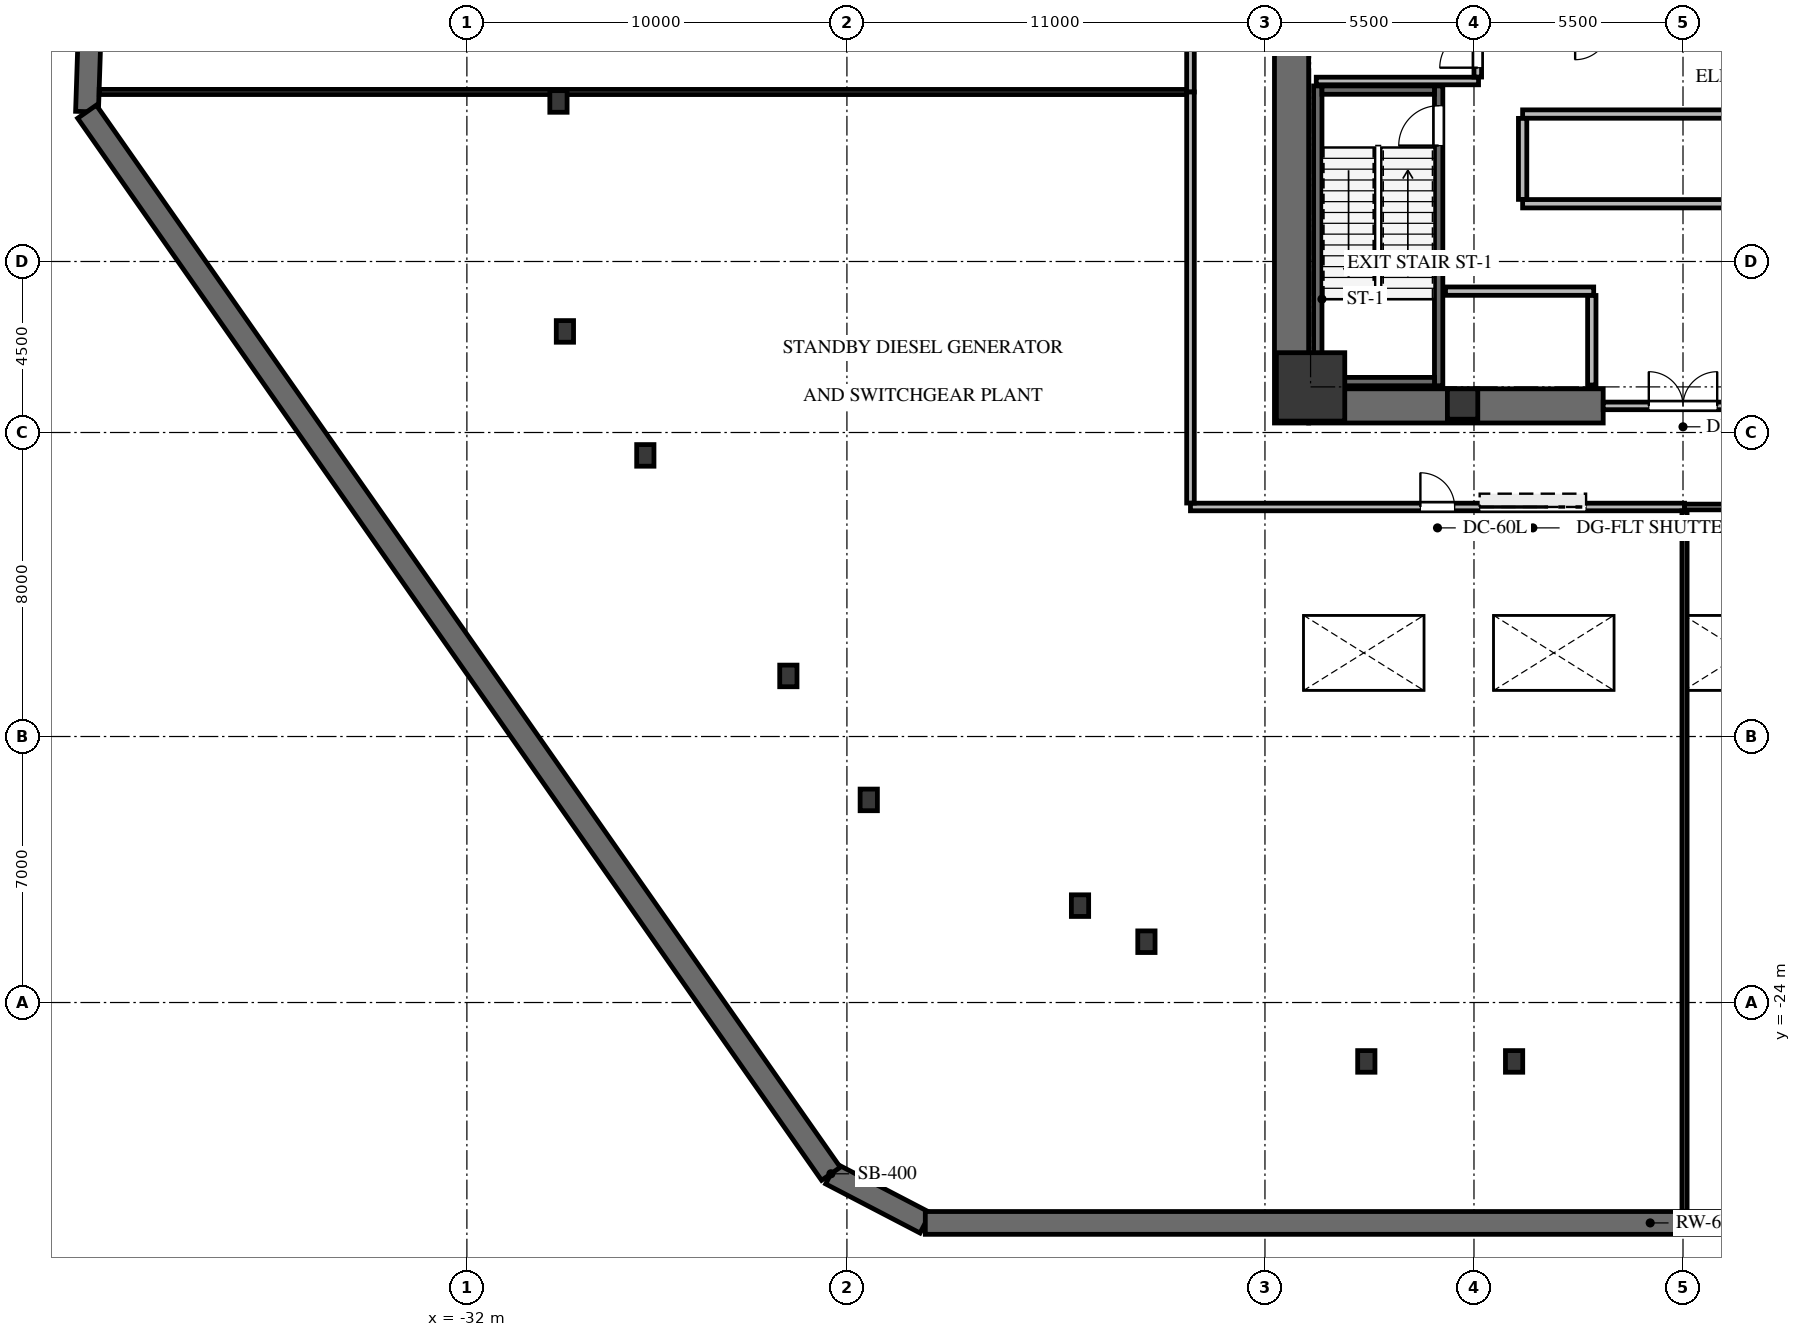
"""IFC4 building model, lengths in metres.
Left out: names, types, materials, properties, quantities, classifications, styles, units other than length and angle.
Written with IfcOpenShell. Run it as: python <this file> out.ifc"""

import sys

from ifc_helpers import new_model, si_unit, direction, frame, frame_2d, origin, origin_2d, place, context, subcontext, project, spatial, rectangle, i_section, extrude, source, transform, mapped, element, fill, save


model = new_model("IFC4")
c1 = context("Model", 3, precision=1e-05, world=origin(), true_north=direction((0.0, 1.0)))
c2 = subcontext(c1, "Body", "Model", "MODEL_VIEW")
j1 = project(units=[si_unit("LENGTHUNIT", "METRE"), si_unit("PLANEANGLEUNIT", "RADIAN")], contexts=[c1])
p1 = place(None, origin())
s1 = spatial("IfcSite", under=j1, at=p1, CompositionType="ELEMENT")
p2 = place(p1, origin())
s2 = spatial("IfcBuilding", under=s1, at=p2, CompositionType="ELEMENT")
p3 = place(p2, frame((0.0, 0.0, -10.0)))
s3 = spatial("IfcBuildingStorey", under=s2, at=p3, CompositionType="ELEMENT", Elevation=-10.0)
p4 = place(p3, frame((-22.421, -28.507, 0.0), z_axis=(0.0, 0.0, 1.0), x_axis=(0.887001141035, -0.461767231192, 0.0)))
e1 = element("IfcWall", 1, at=p4, inside=s3, PredefinedType="USERDEFINED", context=c2, shape_type="SweptSolid", body=[
    extrude(rectangle(XDim=2.8, YDim=0.6, at=frame_2d((1.4, 0.0))), origin(), (0.0, 0.0, 1.0), 5.0),
])
p5 = place(p3, frame((-19.938, -29.8, 0.0), z_axis=(0.0, 0.0, 1.0), x_axis=(1.0, 0.0, 0.0)))
e2 = element("IfcWall", 2, at=p5, inside=s3, PredefinedType="USERDEFINED", context=c2, shape_type="SweptSolid", body=[
    extrude(rectangle(XDim=38.149, YDim=0.6, at=frame_2d((19.075, 0.0))), origin(), (0.0, 0.0, 1.0), 5.0),
])
p6 = place(p3, frame((-41.904, 2.24, 0.0), z_axis=(0.0, 0.0, 1.0), x_axis=(-0.032870651185, -0.999459614137, 0.0)))
e3 = element("IfcWall", 3, at=p6, inside=s3, PredefinedType="USERDEFINED", context=c2, shape_type="SweptSolid", body=[
    extrude(rectangle(XDim=2.8, YDim=0.6, at=frame_2d((1.4, 0.0))), origin(), (0.0, 0.0, 1.0), 5.0),
])
p7 = place(p3, frame((-41.996, -0.558, 0.0), z_axis=(0.0, 0.0, 1.0), x_axis=(0.573667370151, -0.819088364234, 0.0)))
e4 = element("IfcWall", 4, at=p7, inside=s3, PredefinedType="USERDEFINED", context=c2, shape_type="SweptSolid", body=[
    extrude(rectangle(XDim=34.122, YDim=0.6, at=frame_2d((17.061, 0.0))), origin(), (0.0, 0.0, 1.0), 5.0),
])
p8 = place(p3, frame((-10.3, -8.75, 0.0), z_axis=(0.0, 0.0, 1.0), x_axis=(0.0, 1.0, 0.0)))
e5 = element("IfcWall", 5, at=p8, inside=s3, PredefinedType="SHEAR", context=c2, shape_type="SweptSolid", body=[
    extrude(rectangle(XDim=17.5, YDim=0.9, at=frame_2d((8.75, 0.0))), origin(), (0.0, 0.0, 1.0), 5.0),
])
p9 = place(p3, frame((-9.85, -8.3, 0.0), z_axis=(0.0, 0.0, 1.0), x_axis=(1.0, 0.0, 0.0)))
e6 = element("IfcWall", 6, at=p9, inside=s3, PredefinedType="SHEAR", context=c2, shape_type="SweptSolid", body=[
    extrude(rectangle(XDim=7.75, YDim=0.9, at=frame_2d((3.875, 0.0))), origin(), (0.0, 0.0, 1.0), 5.0),
])
p10 = place(p3, frame((-6.43, -7.77, 0.0), z_axis=(0.0, 0.0, 1.0), x_axis=(0.0, 1.0, 0.0)))
e7 = element("IfcWall", 7, at=p10, inside=s3, PredefinedType="SHEAR", context=c2, shape_type="SweptSolid", body=[
    extrude(rectangle(XDim=7.89, YDim=0.22, at=frame_2d((3.945, 0.0))), origin(), (0.0, 0.0, 1.0), 4.65),
])
p11 = place(p10, frame((6.32, 0.0, 0.0)))
e8 = element("IfcOpeningElement", 8, at=p11, cuts=e7, PredefinedType="OPENING", context=c2, shape_type="SweptSolid", body=[
    extrude(rectangle(XDim=1.05, YDim=2.15, at=frame_2d((0.525, 1.075))), frame((0.0, 0.12, 0.0), z_axis=(0.0, -1.0, 0.0), x_axis=(1.0, 0.0, 0.0)), (0.0, 0.0, 1.0), 0.24),
])
p12 = place(p3, frame((-9.61, 0.12, 0.0), z_axis=(0.0, 0.0, 1.0), x_axis=(0.0, -1.0, 0.0)))
e9 = element("IfcWall", 9, at=p12, inside=s3, PredefinedType="SHEAR", context=c2, shape_type="SweptSolid", body=[
    extrude(rectangle(XDim=7.89, YDim=0.22, at=frame_2d((3.945, 0.0))), origin(), (0.0, 0.0, 1.0), 4.65),
])
for number, where, z_axis, x_axis in (
    (10, (-9.5, -7.66, 0.0), (0.0, 0.0, 1.0), (1.0, 0.0, 0.0)),
    (11, (-6.54, 0.01, 0.0), (0.0, 0.0, 1.0), (-1.0, 0.0, 0.0)),
):
    element("IfcWall", number, at=place(p3, frame(where, z_axis=z_axis, x_axis=x_axis)), inside=s3, PredefinedType="SHEAR", context=c2, shape_type="SweptSolid", body=[
        extrude(rectangle(XDim=2.96, YDim=0.22, at=frame_2d((1.48, 0.0))), origin(), (0.0, 0.0, 1.0), 4.65),
    ])
m1 = source(origin(), c2, "Body", "SweptSolid", [
    extrude(rectangle(XDim=1.8, YDim=1.8, at=origin_2d()), origin(), (0.0, 0.0, 1.0), 4.65),
])
p13 = place(p3, frame((-9.8, -7.8, 0.0), z_axis=(0.0, 0.0, 1.0), x_axis=(1.0, 0.0, 0.0)))
e12 = element("IfcColumn", 12, at=p13, inside=s3, PredefinedType="COLUMN", context=c2, shape_type="MappedRepresentation", body=[
    mapped(m1, transform((0.0, 0.0, 0.0), x_axis=(1.0, 0.0, 0.0), y_axis=(0.0, 1.0, 0.0), z_axis=(0.0, 0.0, 1.0), scale=1.0)),
])
m2 = source(origin(), c2, "Body", "SweptSolid", [
    extrude(rectangle(XDim=0.8, YDim=0.8, at=origin_2d()), origin(), (0.0, 0.0, 1.0), 4.65),
])
p14 = place(p3, frame((-5.8, -8.25, 0.0), z_axis=(0.0, 0.0, 1.0), x_axis=(1.0, 0.0, 0.0)))
e13 = element("IfcColumn", 13, at=p14, inside=s3, PredefinedType="PILASTER", context=c2, shape_type="MappedRepresentation", body=[
    mapped(m2, transform((0.0, 0.0, 0.0), x_axis=(1.0, 0.0, 0.0), y_axis=(0.0, 1.0, 0.0), z_axis=(0.0, 0.0, 1.0), scale=1.0)),
])
m3 = source(origin(), c2, "Body", "SweptSolid", [
    extrude(i_section(OverallWidth=0.454, OverallDepth=0.569, WebThickness=0.078, FlangeThickness=0.125, FilletRadius=0.031, at=origin_2d()), origin(), (0.0, 0.0, 1.0), 4.65),
])
for number, where, z_axis, x_axis in (
    (14, (-15.866, -21.451, 0.0), (0.0, 0.0, 1.0), (1.0, 0.0, 0.0)),
    (15, (-29.591, -0.289, 0.0), (0.0, 0.0, 1.0), (1.0, 0.0, 0.0)),
    (16, (-14.119, -22.4, 0.0), (0.0, 0.0, 1.0), (1.0, 0.0, 0.0)),
    (17, (-8.333, -25.55, 0.0), (0.0, 0.0, 1.0), (1.0, 0.0, 0.0)),
    (18, (-4.445, -25.55, 0.0), (0.0, 0.0, 1.0), (1.0, 0.0, 0.0)),
    (19, (-29.42, -6.34, 0.0), (0.0, 0.0, 1.0), (1.0, 0.0, 0.0)),
    (20, (-27.305, -9.603, 0.0), (0.0, 0.0, 1.0), (1.0, 0.0, 0.0)),
    (21, (-23.541, -15.406, 0.0), (0.0, 0.0, 1.0), (1.0, 0.0, 0.0)),
    (22, (-21.425, -18.668, 0.0), (0.0, 0.0, 1.0), (1.0, 0.0, 0.0)),
):
    element("IfcColumn", number, at=place(p3, frame(where, z_axis=z_axis, x_axis=x_axis)), inside=s3, PredefinedType="COLUMN", context=c2, shape_type="MappedRepresentation", body=[
        mapped(m3, transform((0.0, 0.0, 0.0), x_axis=(1.0, 0.0, 0.0), y_axis=(0.0, 1.0, 0.0), z_axis=(0.0, 0.0, 1.0), scale=1.0)),
    ])
p15 = place(p3, frame((-2.1, -8.3, 0.0), z_axis=(0.0, 0.0, 1.0), x_axis=(1.0, 0.0, 0.0)))
e23 = element("IfcWall", 23, at=p15, inside=s3, PredefinedType="SOLIDWALL", context=c2, shape_type="SweptSolid", body=[
    extrude(rectangle(XDim=4.2, YDim=0.2, at=frame_2d((2.1, 0.0))), origin(), (0.0, 0.0, 1.0), 4.635),
])
p16 = place(p15, frame((1.2, 0.0, 0.0)))
e24 = element("IfcOpeningElement", 24, at=p16, cuts=e23, PredefinedType="OPENING", context=c2, shape_type="SweptSolid", body=[
    extrude(rectangle(XDim=1.8, YDim=2.15, at=frame_2d((0.9, 1.075))), frame((0.0, 0.11, 0.0), z_axis=(0.0, -1.0, 0.0), x_axis=(1.0, 0.0, 0.0)), (0.0, 0.0, 1.0), 0.22),
])
p17 = place(p3, frame((-9.65, 0.25, 0.0), z_axis=(0.0, 0.0, 1.0), x_axis=(1.0, 0.0, 0.0)))
e25 = element("IfcWall", 25, at=p17, inside=s3, PredefinedType="SOLIDWALL", context=c2, shape_type="SweptSolid", body=[
    extrude(rectangle(XDim=4.27, YDim=0.2, at=frame_2d((2.135, 0.0))), origin(), (0.0, 0.0, 1.0), 4.635),
])
p18 = place(p3, frame((-5.4, 0.354, 0.0), z_axis=(0.0, 0.0, 1.0), x_axis=(0.0, 1.0, 0.0)))
e26 = element("IfcWall", 26, at=p18, inside=s3, PredefinedType="SOLIDWALL", context=c2, shape_type="SweptSolid", body=[
    extrude(rectangle(XDim=4.026, YDim=0.2, at=frame_2d((2.013, 0.0))), origin(), (0.0, 0.0, 1.0), 4.635),
])
p19 = place(p18, frame((0.246, 0.0, 0.0)))
e27 = element("IfcOpeningElement", 27, at=p19, cuts=e26, PredefinedType="OPENING", context=c2, shape_type="SweptSolid", body=[
    extrude(rectangle(XDim=1.0, YDim=2.15, at=frame_2d((0.5, 1.075))), frame((0.0, 0.11, 0.0), z_axis=(0.0, -1.0, 0.0), x_axis=(1.0, 0.0, 0.0)), (0.0, 0.0, 1.0), 0.22),
])
p20 = place(p3, frame((-6.25, -5.28, 0.0), z_axis=(0.0, 0.0, 1.0), x_axis=(1.0, 0.0, 0.0)))
e28 = element("IfcWall", 28, at=p20, inside=s3, PredefinedType="SOLIDWALL", context=c2, shape_type="SweptSolid", body=[
    extrude(rectangle(XDim=3.9, YDim=0.22, at=frame_2d((1.95, 0.0))), origin(), (0.0, 0.0, 1.0), 4.635),
])
p21 = place(p3, frame((-2.4, -7.75, 0.0), z_axis=(0.0, 0.0, 1.0), x_axis=(0.0, 1.0, 0.0)))
e29 = element("IfcWall", 29, at=p21, inside=s3, PredefinedType="SOLIDWALL", context=c2, shape_type="SweptSolid", body=[
    extrude(rectangle(XDim=2.356, YDim=0.22, at=frame_2d((1.178, 0.0))), origin(), (0.0, 0.0, 1.0), 4.635),
])
for number, where, z_axis, x_axis in (
    (30, (-4.22, -2.98, 0.0), (0.0, 0.0, 1.0), (1.0, 0.0, 0.0)),
    (31, (-4.22, -0.62, 0.0), (0.0, 0.0, 1.0), (1.0, 0.0, 0.0)),
):
    element("IfcWall", number, at=place(p3, frame(where, z_axis=z_axis, x_axis=x_axis)), inside=s3, PredefinedType="SOLIDWALL", context=c2, shape_type="SweptSolid", body=[
        extrude(rectangle(XDim=7.24, YDim=0.22, at=frame_2d((3.62, 0.0))), origin(), (0.0, 0.0, 1.0), 4.635),
    ])
p22 = place(p3, frame((-4.22, -2.866, 0.0), z_axis=(0.0, 0.0, 1.0), x_axis=(0.0, 1.0, 0.0)))
e32 = element("IfcWall", 32, at=p22, inside=s3, PredefinedType="SOLIDWALL", context=c2, shape_type="SweptSolid", body=[
    extrude(rectangle(XDim=2.132, YDim=0.22, at=frame_2d((1.066, 0.0))), origin(), (0.0, 0.0, 1.0), 4.635),
])
p23 = place(p3, frame((-12.96, 10.856, 0.0), z_axis=(0.0, 0.0, 1.0), x_axis=(0.0, -1.0, 0.0)))
e33 = element("IfcWall", 33, at=p23, inside=s3, PredefinedType="SOLIDWALL", context=c2, shape_type="SweptSolid", body=[
    extrude(rectangle(XDim=10.896, YDim=0.2, at=frame_2d((5.448, 0.0))), origin(), (0.0, 0.0, 1.0), 3.629),
])
p24 = place(p3, frame((-12.96, -10.96, 0.0), z_axis=(0.0, 0.0, 1.0), x_axis=(1.0, 0.0, 0.0)))
e34 = element("IfcWall", 34, at=p24, inside=s3, PredefinedType="SOLIDWALL", context=c2, shape_type="SweptSolid", body=[
    extrude(rectangle(XDim=13.0, YDim=0.2, at=frame_2d((6.5, 0.0))), origin(), (0.0, 0.0, 1.0), 3.629),
])
p25 = place(p24, frame((6.05, 0.0, 0.0)))
e35 = element("IfcOpeningElement", 35, at=p25, cuts=e34, PredefinedType="OPENING", context=c2, shape_type="SweptSolid", body=[
    extrude(rectangle(XDim=0.9, YDim=2.05, at=frame_2d((0.45, 1.025))), frame((0.0, 0.11, 0.0), z_axis=(0.0, -1.0, 0.0), x_axis=(1.0, 0.0, 0.0)), (0.0, 0.0, 1.0), 0.22),
])
p26 = place(p24, frame((7.61, 0.0, 0.0)))
e36 = element("IfcOpeningElement", 36, at=p26, cuts=e34, PredefinedType="OPENING", context=c2, shape_type="SweptSolid", body=[
    extrude(rectangle(XDim=2.8, YDim=2.4, at=frame_2d((1.4, 1.2))), frame((0.0, 0.11, 0.0), z_axis=(0.0, -1.0, 0.0), x_axis=(1.0, 0.0, 0.0)), (0.0, 0.0, 1.0), 0.22),
])
p27 = place(p3, frame((-12.96, -0.04, 0.0), z_axis=(0.0, 0.0, 1.0), x_axis=(0.0, -1.0, 0.0)))
e37 = element("IfcWall", 37, at=p27, inside=s3, PredefinedType="SOLIDWALL", context=c2, shape_type="SweptSolid", body=[
    extrude(rectangle(XDim=10.816, YDim=0.2, at=frame_2d((5.408, 0.0))), origin(), (0.0, 0.0, 1.0), 4.635),
])
p28 = place(p3, frame((0.04, -10.96, 0.0), z_axis=(0.0, 0.0, 1.0), x_axis=(1.0, 0.0, 0.0)))
e38 = element("IfcWall", 38, at=p28, inside=s3, PredefinedType="PARTITIONING", context=c2, shape_type="SweptSolid", body=[
    extrude(rectangle(XDim=12.92, YDim=0.15, at=frame_2d((6.46, 0.0))), origin(), (0.0, 0.0, 1.0), 3.629),
])
p29 = place(p28, frame((6.01, 0.0, 0.0)))
e39 = element("IfcOpeningElement", 39, at=p29, cuts=e38, PredefinedType="OPENING", context=c2, shape_type="SweptSolid", body=[
    extrude(rectangle(XDim=0.9, YDim=2.05, at=frame_2d((0.45, 1.025))), frame((0.0, 0.085, 0.0), z_axis=(0.0, -1.0, 0.0), x_axis=(1.0, 0.0, 0.0)), (0.0, 0.0, 1.0), 0.17),
])
p30 = place(p3, frame((-13.064, -0.04, 0.0), z_axis=(0.0, 0.0, 1.0), x_axis=(-0.99999999909, 4.2667577e-05, 0.0)))
e40 = element("IfcWall", 40, at=p30, inside=s3, PredefinedType="PARTITIONING", context=c2, shape_type="SweptSolid", body=[
    extrude(rectangle(XDim=28.61, YDim=0.135, at=frame_2d((14.305, 0.0))), origin(), (0.0, 0.0, 1.0), 3.629),
])
p31 = place(p3, frame((0.04, -11.064, 0.0), z_axis=(0.0, 0.0, 1.0), x_axis=(0.0, -1.0, 0.0)))
e41 = element("IfcWall", 41, at=p31, inside=s3, PredefinedType="PARTITIONING", context=c2, shape_type="SweptSolid", body=[
    extrude(rectangle(XDim=18.431, YDim=0.135, at=frame_2d((9.216, 0.0))), origin(), (0.0, 0.0, 1.0), 3.944),
])
m4 = source(origin(), c2, "Body", "SweptSolid", [
    extrude(rectangle(XDim=1.05, YDim=2.15, at=frame_2d((0.525, 1.075))), frame((0.0, 0.025, 0.0), z_axis=(0.0, -1.0, 0.0), x_axis=(1.0, 0.0, 0.0)), (0.0, 0.0, 1.0), 0.05),
])
p32 = place(p11, origin())
e42 = element("IfcDoor", 42, at=p32, inside=s3, OperationType="SINGLE_SWING_LEFT", PredefinedType="DOOR", context=c2, shape_type="MappedRepresentation", body=[
    mapped(m4, transform((0.0, 0.0, 0.0), x_axis=(1.0, 0.0, 0.0), y_axis=(0.0, 1.0, 0.0), z_axis=(0.0, 0.0, 1.0), scale=1.0)),
])
fill(e8, e42)
m5 = source(origin(), c2, "Body", "SweptSolid", [
    extrude(rectangle(XDim=1.8, YDim=2.15, at=frame_2d((0.9, 1.075))), frame((0.0, 0.025, 0.0), z_axis=(0.0, -1.0, 0.0), x_axis=(1.0, 0.0, 0.0)), (0.0, 0.0, 1.0), 0.05),
])
p33 = place(p16, origin())
e43 = element("IfcDoor", 43, at=p33, inside=s3, OperationType="DOUBLE_DOOR_SINGLE_SWING", PredefinedType="DOOR", context=c2, shape_type="MappedRepresentation", body=[
    mapped(m5, transform((0.0, 0.0, 0.0), x_axis=(1.0, 0.0, 0.0), y_axis=(0.0, 1.0, 0.0), z_axis=(0.0, 0.0, 1.0), scale=1.0)),
])
fill(e24, e43)
m6 = source(origin(), c2, "Body", "SweptSolid", [
    extrude(rectangle(XDim=1.0, YDim=2.15, at=frame_2d((0.5, 1.075))), frame((0.0, 0.025, 0.0), z_axis=(0.0, -1.0, 0.0), x_axis=(1.0, 0.0, 0.0)), (0.0, 0.0, 1.0), 0.05),
])
p34 = place(p19, origin())
e44 = element("IfcDoor", 44, at=p34, inside=s3, OperationType="SINGLE_SWING_LEFT", PredefinedType="DOOR", context=c2, shape_type="MappedRepresentation", body=[
    mapped(m6, transform((0.0, 0.0, 0.0), x_axis=(1.0, 0.0, 0.0), y_axis=(0.0, 1.0, 0.0), z_axis=(0.0, 0.0, 1.0), scale=1.0)),
])
fill(e27, e44)
m7 = source(origin(), c2, "Body", "SweptSolid", [
    extrude(rectangle(XDim=0.9, YDim=2.05, at=frame_2d((0.45, 1.025))), frame((0.0, 0.025, 0.0), z_axis=(0.0, -1.0, 0.0), x_axis=(1.0, 0.0, 0.0)), (0.0, 0.0, 1.0), 0.05),
])
p35 = place(p25, origin())
e45 = element("IfcDoor", 45, at=p35, inside=s3, OperationType="SINGLE_SWING_LEFT", PredefinedType="DOOR", context=c2, shape_type="MappedRepresentation", body=[
    mapped(m7, transform((0.0, 0.0, 0.0), x_axis=(1.0, 0.0, 0.0), y_axis=(0.0, 1.0, 0.0), z_axis=(0.0, 0.0, 1.0), scale=1.0)),
])
fill(e35, e45)
m8 = source(origin(), c2, "Body", "SweptSolid", [
    extrude(rectangle(XDim=2.8, YDim=2.4, at=frame_2d((1.4, 1.2))), frame((0.0, 0.025, 0.0), z_axis=(0.0, -1.0, 0.0), x_axis=(1.0, 0.0, 0.0)), (0.0, 0.0, 1.0), 0.05),
])
p36 = place(p26, origin())
e46 = element("IfcDoor", 46, at=p36, inside=s3, OperationType="ROLLINGUP", PredefinedType="GATE", context=c2, shape_type="MappedRepresentation", body=[
    mapped(m8, transform((0.0, 0.0, 0.0), x_axis=(1.0, 0.0, 0.0), y_axis=(0.0, 1.0, 0.0), z_axis=(0.0, 0.0, 1.0), scale=1.0)),
])
fill(e36, e46)
save(model, sys.argv[1])
